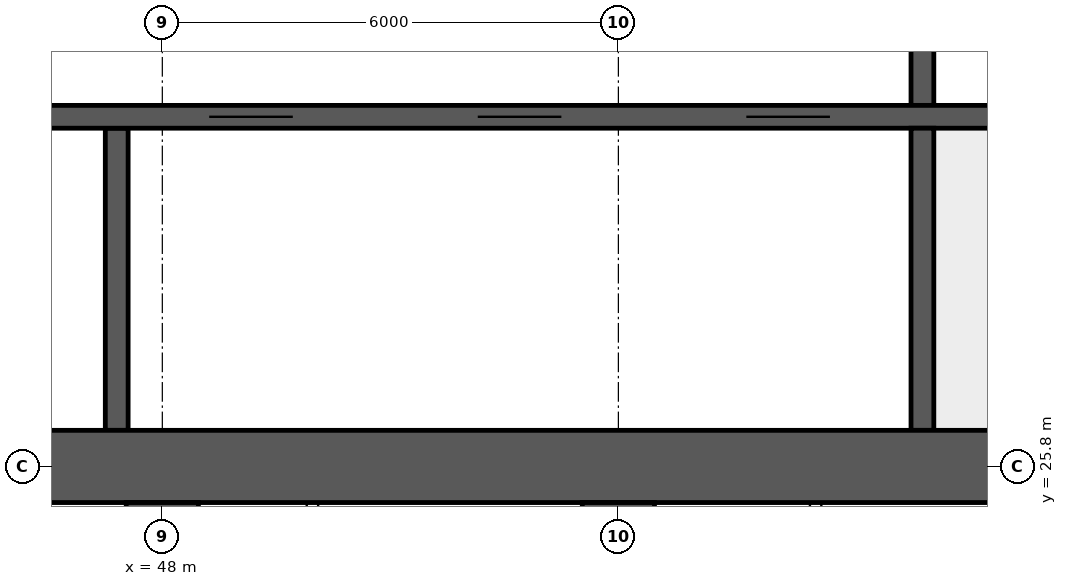
"""IFC4 building model, lengths in metres.
Left out: names, types, materials, properties, quantities, classifications, styles, units other than length and angle.
Written with IfcOpenShell. Run it as: python <this file> out.ifc"""

import sys

from ifc_helpers import new_model, si_unit, direction, frame, frame_2d, origin, place, context, subcontext, project, spatial, rectangle, extrude, element, fill, save


model = new_model("IFC4")
c1 = context("Model", 3, precision=1e-05, world=origin(), true_north=direction((0.0, 1.0)))
c2 = subcontext(c1, "Body", "Model", "MODEL_VIEW")
j1 = project(units=[si_unit("LENGTHUNIT", "METRE"), si_unit("PLANEANGLEUNIT", "RADIAN")], contexts=[c1])
p1 = place(None, origin())
s1 = spatial("IfcSite", under=j1, at=p1, CompositionType="ELEMENT")
p2 = place(p1, origin())
s2 = spatial("IfcBuilding", under=s1, at=p2, CompositionType="ELEMENT")
p3 = place(p2, frame((0.0, 0.0, 140.35)))
s3 = spatial("IfcBuildingStorey", under=s2, at=p3, CompositionType="ELEMENT", Elevation=140.35)
p4 = place(p3, frame((18.0, 25.8, 0.0), z_axis=(0.0, 0.0, 1.0), x_axis=(1.0, 0.0, 0.0)))
e1 = element("IfcWall", 1, at=p4, inside=s3, PredefinedType="SHEAR", context=c2, shape_type="SweptSolid", body=[
    extrude(rectangle(XDim=48.0, YDim=0.95, at=frame_2d((24.0, 0.0))), origin(), (0.0, 0.0, 1.0), 4.5),
])
p5 = place(p3, frame((18.475, 30.4, 0.0), z_axis=(0.0, 0.0, 1.0), x_axis=(1.0, 0.0, 0.0)))
e2 = element("IfcWall", 2, at=p5, inside=s3, PredefinedType="SHEAR", context=c2, shape_type="SweptSolid", body=[
    extrude(rectangle(XDim=47.05, YDim=0.3, at=frame_2d((23.525, 0.0))), origin(), (0.0, 0.0, 1.0), 4.5),
])
p6 = place(p5, frame((0.4, 0.0, 0.0)))
e3 = element("IfcOpeningElement", 3, at=p6, cuts=e2, PredefinedType="OPENING", context=c2, shape_type="SweptSolid", body=[
    extrude(rectangle(XDim=1.0, YDim=2.1, at=frame_2d((0.5, 1.05))), frame((0.0, 0.16, 0.0), z_axis=(0.0, -1.0, 0.0), x_axis=(1.0, 0.0, 0.0)), (0.0, 0.0, 1.0), 0.32),
])
p7 = place(p5, frame((45.65, 0.0, 0.0)))
e4 = element("IfcOpeningElement", 4, at=p7, cuts=e2, PredefinedType="OPENING", context=c2, shape_type="SweptSolid", body=[
    extrude(rectangle(XDim=1.0, YDim=2.1, at=frame_2d((0.5, 1.05))), frame((0.0, 0.16, 0.0), z_axis=(0.0, -1.0, 0.0), x_axis=(1.0, 0.0, 0.0)), (0.0, 0.0, 1.0), 0.32),
])
p8 = place(p5, frame((8.275, 0.0, 0.0)))
e5 = element("IfcOpeningElement", 5, at=p8, cuts=e2, PredefinedType="OPENING", context=c2, shape_type="SweptSolid", body=[
    extrude(rectangle(XDim=1.1, YDim=2.1, at=frame_2d((0.55, 1.05))), frame((0.0, 0.16, 0.0), z_axis=(0.0, -1.0, 0.0), x_axis=(1.0, 0.0, 0.0)), (0.0, 0.0, 1.0), 0.32),
])
p9 = place(p5, frame((10.875, 0.0, 0.0)))
e6 = element("IfcOpeningElement", 6, at=p9, cuts=e2, PredefinedType="OPENING", context=c2, shape_type="SweptSolid", body=[
    extrude(rectangle(XDim=1.1, YDim=2.1, at=frame_2d((0.55, 1.05))), frame((0.0, 0.16, 0.0), z_axis=(0.0, -1.0, 0.0), x_axis=(1.0, 0.0, 0.0)), (0.0, 0.0, 1.0), 0.32),
])
p10 = place(p5, frame((13.475, 0.0, 0.0)))
e7 = element("IfcOpeningElement", 7, at=p10, cuts=e2, PredefinedType="OPENING", context=c2, shape_type="SweptSolid", body=[
    extrude(rectangle(XDim=1.1, YDim=2.1, at=frame_2d((0.55, 1.05))), frame((0.0, 0.16, 0.0), z_axis=(0.0, -1.0, 0.0), x_axis=(1.0, 0.0, 0.0)), (0.0, 0.0, 1.0), 0.32),
])
p11 = place(p5, frame((16.075, 0.0, 0.0)))
e8 = element("IfcOpeningElement", 8, at=p11, cuts=e2, PredefinedType="OPENING", context=c2, shape_type="SweptSolid", body=[
    extrude(rectangle(XDim=1.1, YDim=2.1, at=frame_2d((0.55, 1.05))), frame((0.0, 0.16, 0.0), z_axis=(0.0, -1.0, 0.0), x_axis=(1.0, 0.0, 0.0)), (0.0, 0.0, 1.0), 0.32),
])
p12 = place(p5, frame((18.85, 0.0, 0.0)))
e9 = element("IfcOpeningElement", 9, at=p12, cuts=e2, PredefinedType="OPENING", context=c2, shape_type="SweptSolid", body=[
    extrude(rectangle(XDim=0.9, YDim=2.1, at=frame_2d((0.45, 1.05))), frame((0.0, 0.16, 0.0), z_axis=(0.0, -1.0, 0.0), x_axis=(1.0, 0.0, 0.0)), (0.0, 0.0, 1.0), 0.32),
])
p13 = place(p5, frame((21.5, 0.0, 0.0)))
e10 = element("IfcOpeningElement", 10, at=p13, cuts=e2, PredefinedType="OPENING", context=c2, shape_type="SweptSolid", body=[
    extrude(rectangle(XDim=1.1, YDim=2.1, at=frame_2d((0.55, 1.05))), frame((0.0, 0.16, 0.0), z_axis=(0.0, -1.0, 0.0), x_axis=(1.0, 0.0, 0.0)), (0.0, 0.0, 1.0), 0.32),
])
p14 = place(p5, frame((30.142, 0.0, 0.0)))
e11 = element("IfcOpeningElement", 11, at=p14, cuts=e2, PredefinedType="OPENING", context=c2, shape_type="SweptSolid", body=[
    extrude(rectangle(XDim=1.1, YDim=2.1, at=frame_2d((0.55, 1.05))), frame((0.0, 0.16, 0.0), z_axis=(0.0, -1.0, 0.0), x_axis=(1.0, 0.0, 0.0)), (0.0, 0.0, 1.0), 0.32),
])
p15 = place(p5, frame((33.675, 0.0, 0.0)))
e12 = element("IfcOpeningElement", 12, at=p15, cuts=e2, PredefinedType="OPENING", context=c2, shape_type="SweptSolid", body=[
    extrude(rectangle(XDim=1.1, YDim=2.1, at=frame_2d((0.55, 1.05))), frame((0.0, 0.16, 0.0), z_axis=(0.0, -1.0, 0.0), x_axis=(1.0, 0.0, 0.0)), (0.0, 0.0, 1.0), 0.32),
])
p16 = place(p5, frame((37.208, 0.0, 0.0)))
e13 = element("IfcOpeningElement", 13, at=p16, cuts=e2, PredefinedType="OPENING", context=c2, shape_type="SweptSolid", body=[
    extrude(rectangle(XDim=1.1, YDim=2.1, at=frame_2d((0.55, 1.05))), frame((0.0, 0.16, 0.0), z_axis=(0.0, -1.0, 0.0), x_axis=(1.0, 0.0, 0.0)), (0.0, 0.0, 1.0), 0.32),
])
p17 = place(p3, frame((58.0, 26.275, 0.0), z_axis=(0.0, 0.0, 1.0), x_axis=(0.0, 1.0, 0.0)))
e14 = element("IfcWall", 14, at=p17, inside=s3, PredefinedType="SHEAR", context=c2, shape_type="SweptSolid", body=[
    extrude(rectangle(XDim=3.975, YDim=0.3, at=frame_2d((1.988, 0.0))), origin(), (0.0, 0.0, 1.0), 4.5),
])
p18 = place(p3, frame((58.0, 30.55, 0.0), z_axis=(0.0, 0.0, 1.0), x_axis=(0.0, 1.0, 0.0)))
e15 = element("IfcWall", 15, at=p18, inside=s3, PredefinedType="SHEAR", context=c2, shape_type="SweptSolid", body=[
    extrude(rectangle(XDim=3.9, YDim=0.3, at=frame_2d((1.95, 0.0))), origin(), (0.0, 0.0, 1.0), 4.5),
])
p19 = place(p18, frame((1.4, 0.0, 0.0)))
e16 = element("IfcOpeningElement", 16, at=p19, cuts=e15, PredefinedType="OPENING", context=c2, shape_type="SweptSolid", body=[
    extrude(rectangle(XDim=1.2, YDim=2.1, at=frame_2d((0.6, 1.05))), frame((0.0, 0.16, 0.0), z_axis=(0.0, -1.0, 0.0), x_axis=(1.0, 0.0, 0.0)), (0.0, 0.0, 1.0), 0.32),
])
p20 = place(p3, frame((47.4, 26.275, 0.0), z_axis=(0.0, 0.0, 1.0), x_axis=(0.0, 1.0, 0.0)))
e17 = element("IfcWall", 17, at=p20, inside=s3, PredefinedType="SHEAR", context=c2, shape_type="SweptSolid", body=[
    extrude(rectangle(XDim=3.975, YDim=0.3, at=frame_2d((1.988, 0.0))), origin(), (0.0, 0.0, 1.0), 4.5),
])
for number, where, z_axis, x_axis in (
    (18, (48.0, 17.2, 0.0), (0.0, 0.0, 1.0), (0.0, 1.0, 0.0)),
    (19, (54.0, 17.2, 0.0), (0.0, 0.0, 1.0), (0.0, 1.0, 0.0)),
):
    element("IfcWall", number, at=place(p3, frame(where, z_axis=z_axis, x_axis=x_axis)), inside=s3, PredefinedType="SHEAR", context=c2, shape_type="SweptSolid", body=[
        extrude(rectangle(XDim=8.125, YDim=0.95, at=frame_2d((4.062, 0.0))), origin(), (0.0, 0.0, 1.0), 4.5),
    ])
for number, where, z_axis, x_axis in (
    (20, (49.975, 17.3, 0.0), (0.0, 0.0, 1.0), (0.0, 1.0, 0.0)),
    (21, (56.595, 17.3, 0.0), (0.0, 0.0, 1.0), (0.0, 1.0, 0.0)),
):
    element("IfcWall", number, at=place(p3, frame(where, z_axis=z_axis, x_axis=x_axis)), inside=s3, PredefinedType="PARTITIONING", context=c2, shape_type="SweptSolid", body=[
        extrude(rectangle(XDim=8.025, YDim=0.15, at=frame_2d((4.012, 0.0))), origin(), (0.0, 0.0, 1.0), 4.25),
    ])
p21 = place(p14, origin())
e22 = element("IfcDoor", 22, at=p21, inside=s3, OperationType="DOUBLE_DOOR_SLIDING", PredefinedType="DOOR", context=c2, shape_type="SweptSolid", body=[
    extrude(rectangle(XDim=1.1, YDim=2.1, at=frame_2d((0.55, 1.05))), frame((0.0, 0.025, 0.0), z_axis=(0.0, -1.0, 0.0), x_axis=(1.0, 0.0, 0.0)), (0.0, 0.0, 1.0), 0.05),
])
fill(e11, e22)
p22 = place(p15, origin())
e23 = element("IfcDoor", 23, at=p22, inside=s3, OperationType="DOUBLE_DOOR_SLIDING", PredefinedType="DOOR", context=c2, shape_type="SweptSolid", body=[
    extrude(rectangle(XDim=1.1, YDim=2.1, at=frame_2d((0.55, 1.05))), frame((0.0, 0.025, 0.0), z_axis=(0.0, -1.0, 0.0), x_axis=(1.0, 0.0, 0.0)), (0.0, 0.0, 1.0), 0.05),
])
fill(e12, e23)
p23 = place(p16, origin())
e24 = element("IfcDoor", 24, at=p23, inside=s3, OperationType="DOUBLE_DOOR_SLIDING", PredefinedType="DOOR", context=c2, shape_type="SweptSolid", body=[
    extrude(rectangle(XDim=1.1, YDim=2.1, at=frame_2d((0.55, 1.05))), frame((0.0, 0.025, 0.0), z_axis=(0.0, -1.0, 0.0), x_axis=(1.0, 0.0, 0.0)), (0.0, 0.0, 1.0), 0.05),
])
fill(e13, e24)
save(model, sys.argv[1])
